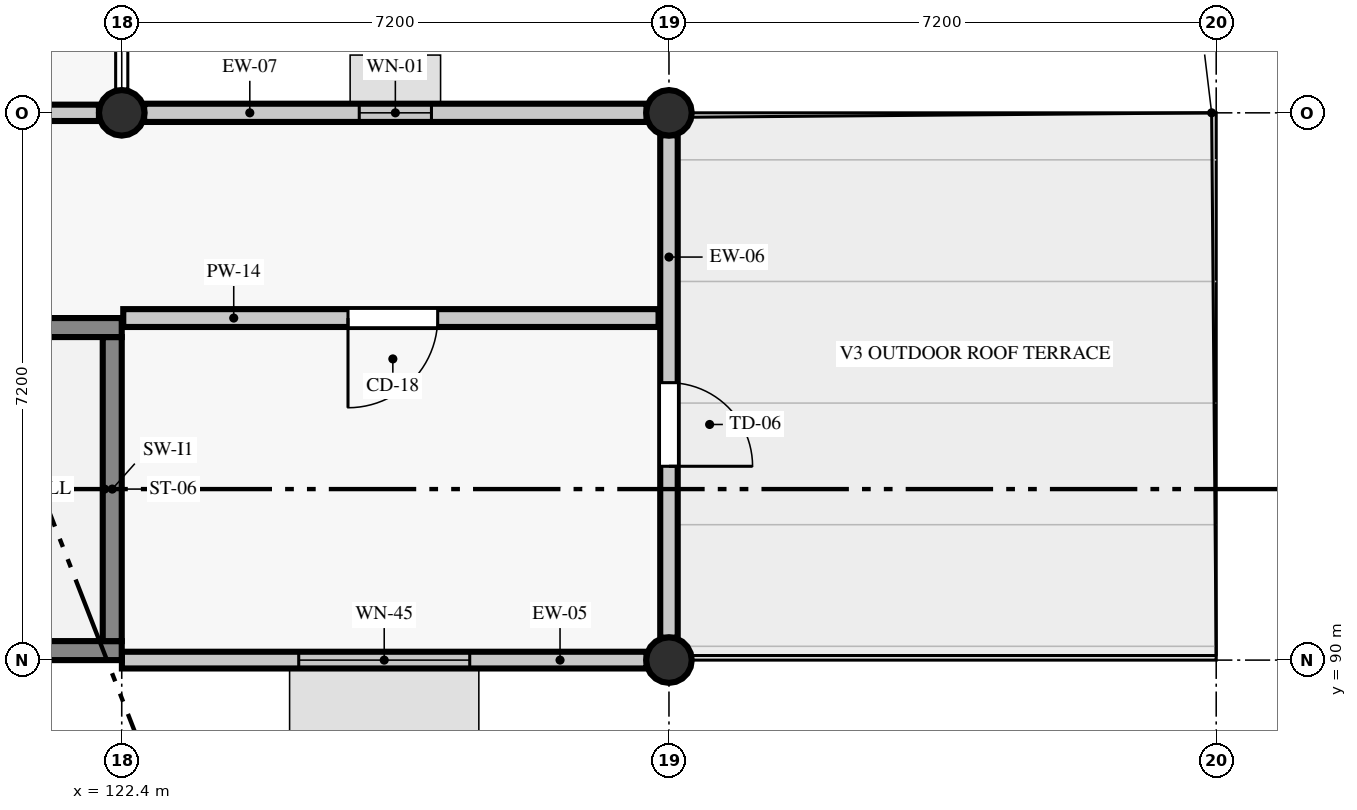
"""IFC4 building model, lengths in metres.
Left out: names, types, materials, properties, quantities, classifications, styles, units other than length and angle.
Written with IfcOpenShell. Run it as: python <this file> out.ifc"""

import sys

from ifc_helpers import new_model, si_unit, direction, frame, frame_2d, origin, origin_2d, place, context, subcontext, project, spatial, rectangle, circle, extrude, element, fill, save


model = new_model("IFC4")
c1 = context("Model", 3, precision=1e-05, world=origin(), true_north=direction((0.0, 1.0)))
c2 = subcontext(c1, "Body", "Model", "MODEL_VIEW")
j1 = project(units=[si_unit("LENGTHUNIT", "METRE"), si_unit("PLANEANGLEUNIT", "RADIAN")], contexts=[c1])
p1 = place(None, origin())
s1 = spatial("IfcSite", under=j1, at=p1, CompositionType="ELEMENT")
p2 = place(p1, origin())
s2 = spatial("IfcBuilding", under=s1, at=p2, CompositionType="ELEMENT")
p3 = place(p2, frame((0.0, 0.0, 9.6)))
s3 = spatial("IfcBuildingStorey", under=s2, at=p3, CompositionType="ELEMENT", Elevation=9.6)
p4 = place(p3, frame((122.4, 97.2, 0.0), z_axis=(0.0, 0.0, 1.0), x_axis=(1.0, 0.0, 0.0)))
e1 = element("IfcColumn", 1, at=p4, inside=s3, PredefinedType="COLUMN", context=c2, shape_type="SweptSolid", body=[
    extrude(circle(Radius=0.3, at=origin_2d()), origin(), (0.0, 0.0, 1.0), 3.925),
])
for number, where, z_axis, x_axis in (
    (2, (129.6, 90.0, 0.0), (0.0, 0.0, 1.0), (1.0, 0.0, 0.0)),
    (3, (129.6, 97.2, 0.0), (0.0, 0.0, 1.0), (1.0, 0.0, 0.0)),
):
    element("IfcColumn", number, at=place(p3, frame(where, z_axis=z_axis, x_axis=x_axis)), inside=s3, PredefinedType="COLUMN", context=c2, shape_type="SweptSolid", body=[
        extrude(circle(Radius=0.3, at=origin_2d()), origin(), (0.0, 0.0, 1.0), 3.958),
    ])
p5 = place(p3, frame((122.402, 90.0, 0.0), z_axis=(0.0, 0.0, 1.0), x_axis=(1.0, 0.0, 0.0)))
e4 = element("IfcWall", 4, at=p5, inside=s3, PredefinedType="STANDARD", context=c2, shape_type="SweptSolid", body=[
    extrude(rectangle(XDim=6.903, YDim=0.22, at=frame_2d((3.451, 0.0))), origin(), (0.0, 0.0, 1.0), 3.925),
])
p6 = place(p5, frame((2.326, 0.0, 0.9)))
e5 = element("IfcOpeningElement", 5, at=p6, cuts=e4, PredefinedType="OPENING", context=c2, shape_type="SweptSolid", body=[
    extrude(rectangle(XDim=2.25, YDim=1.78, at=frame_2d((1.125, 0.89))), frame((0.0, 0.12, 0.0), z_axis=(0.0, -1.0, 0.0), x_axis=(1.0, 0.0, 0.0)), (0.0, 0.0, 1.0), 0.24),
])
p7 = place(p3, frame((129.6, 90.295, 0.0), z_axis=(0.0, 0.0, 1.0), x_axis=(0.0, 1.0, 0.0)))
e6 = element("IfcWall", 6, at=p7, inside=s3, PredefinedType="STANDARD", context=c2, shape_type="SweptSolid", body=[
    extrude(rectangle(XDim=6.61, YDim=0.23, at=frame_2d((3.305, 0.0))), origin(), (0.0, 0.0, 1.0), 3.308),
])
p8 = place(p7, frame((2.255, 0.0, 0.0)))
e7 = element("IfcOpeningElement", 7, at=p8, cuts=e6, PredefinedType="OPENING", context=c2, shape_type="SweptSolid", body=[
    extrude(rectangle(XDim=1.1, YDim=2.12, at=frame_2d((0.55, 1.06))), frame((0.0, 0.125, 0.0), z_axis=(0.0, -1.0, 0.0), x_axis=(1.0, 0.0, 0.0)), (0.0, 0.0, 1.0), 0.25),
])
p9 = place(p3, frame((129.305, 97.2, 0.0), z_axis=(0.0, 0.0, 1.0), x_axis=(-1.0, 0.0, 0.0)))
e8 = element("IfcWall", 8, at=p9, inside=s3, PredefinedType="STANDARD", context=c2, shape_type="SweptSolid", body=[
    extrude(rectangle(XDim=6.61, YDim=0.24, at=frame_2d((3.305, 0.0))), origin(), (0.0, 0.0, 1.0), 3.308),
])
p10 = place(p9, frame((2.83, 0.0, 0.9)))
e9 = element("IfcOpeningElement", 9, at=p10, cuts=e8, PredefinedType="OPENING", context=c2, shape_type="SweptSolid", body=[
    extrude(rectangle(XDim=0.95, YDim=1.3, at=frame_2d((0.475, 0.65))), frame((0.0, 0.13, 0.0), z_axis=(0.0, -1.0, 0.0), x_axis=(1.0, 0.0, 0.0)), (0.0, 0.0, 1.0), 0.26),
])
p11 = place(p3, frame((113.6, 90.125, 0.0), z_axis=(0.0, 0.0, 1.0), x_axis=(1.0, 0.0, 0.0)))
e10 = element("IfcWall", 10, at=p11, inside=s3, PredefinedType="SHEAR", context=c2, shape_type="SweptSolid", body=[
    extrude(rectangle(XDim=8.8, YDim=0.25, at=frame_2d((4.4, 0.0))), origin(), (0.0, 0.0, 1.0), 3.925),
])
p12 = place(p11, frame((0.35, 0.0, 0.92)))
e11 = element("IfcOpeningElement", 11, at=p12, cuts=e10, PredefinedType="OPENING", context=c2, shape_type="SweptSolid", body=[
    extrude(rectangle(XDim=1.18, YDim=1.48, at=frame_2d((0.59, 0.74))), frame((0.0, 0.135, 0.0), z_axis=(0.0, -1.0, 0.0), x_axis=(1.0, 0.0, 0.0)), (0.0, 0.0, 1.0), 0.27),
])
p13 = place(p3, frame((122.275, 90.25, 0.0), z_axis=(0.0, 0.0, 1.0), x_axis=(0.0, 1.0, 0.0)))
e12 = element("IfcWall", 12, at=p13, inside=s3, PredefinedType="SHEAR", context=c2, shape_type="SweptSolid", body=[
    extrude(rectangle(XDim=4.0, YDim=0.25, at=frame_2d((2.0, 0.0))), origin(), (0.0, 0.0, 1.0), 3.925),
])
p14 = place(p3, frame((122.4, 94.375, 0.0), z_axis=(0.0, 0.0, 1.0), x_axis=(-1.0, 0.0, 0.0)))
e13 = element("IfcWall", 13, at=p14, inside=s3, PredefinedType="SHEAR", context=c2, shape_type="SweptSolid", body=[
    extrude(rectangle(XDim=8.8, YDim=0.25, at=frame_2d((4.4, 0.0))), origin(), (0.0, 0.0, 1.0), 3.925),
])
p15 = place(p14, frame((7.0, 0.0, 0.0)))
e14 = element("IfcOpeningElement", 14, at=p15, cuts=e13, PredefinedType="OPENING", context=c2, shape_type="SweptSolid", body=[
    extrude(rectangle(XDim=1.5, YDim=2.15, at=frame_2d((0.75, 1.075))), frame((0.0, 0.135, 0.0), z_axis=(0.0, -1.0, 0.0), x_axis=(1.0, 0.0, 0.0)), (0.0, 0.0, 1.0), 0.27),
])
p16 = place(p3, frame((93.9, 97.2, 0.0), z_axis=(0.0, 0.0, 1.0), x_axis=(1.0, 0.0, 0.0)))
e15 = element("IfcWall", 15, at=p16, inside=s3, PredefinedType="PARTITIONING", context=c2, shape_type="SweptSolid", body=[
    extrude(rectangle(XDim=28.2, YDim=0.215, at=frame_2d((14.1, 0.0))), origin(), (0.0, 0.0, 1.0), 3.175),
])
p17 = place(p16, frame((3.001, 0.0, 0.0)))
e16 = element("IfcOpeningElement", 16, at=p17, cuts=e15, PredefinedType="OPENING", context=c2, shape_type="SweptSolid", body=[
    extrude(rectangle(XDim=1.05, YDim=2.13, at=frame_2d((0.525, 1.065))), frame((0.0, 0.117, 0.0), z_axis=(0.0, -1.0, 0.0), x_axis=(1.0, 0.0, 0.0)), (0.0, 0.0, 1.0), 0.235),
])
p18 = place(p16, frame((8.007, 0.0, 0.0)))
e17 = element("IfcOpeningElement", 17, at=p18, cuts=e15, PredefinedType="OPENING", context=c2, shape_type="SweptSolid", body=[
    extrude(rectangle(XDim=1.1, YDim=2.13, at=frame_2d((0.55, 1.065))), frame((0.0, 0.117, 0.0), z_axis=(0.0, -1.0, 0.0), x_axis=(1.0, 0.0, 0.0)), (0.0, 0.0, 1.0), 0.235),
])
p19 = place(p16, frame((10.04, 0.0, 0.0)))
e18 = element("IfcOpeningElement", 18, at=p19, cuts=e15, PredefinedType="OPENING", context=c2, shape_type="SweptSolid", body=[
    extrude(rectangle(XDim=1.15, YDim=2.13, at=frame_2d((0.575, 1.065))), frame((0.0, 0.117, 0.0), z_axis=(0.0, -1.0, 0.0), x_axis=(1.0, 0.0, 0.0)), (0.0, 0.0, 1.0), 0.235),
])
p20 = place(p16, frame((15.09, 0.0, 0.0)))
e19 = element("IfcOpeningElement", 19, at=p20, cuts=e15, PredefinedType="OPENING", context=c2, shape_type="SweptSolid", body=[
    extrude(rectangle(XDim=0.9, YDim=2.08, at=frame_2d((0.45, 1.04))), frame((0.0, 0.117, 0.0), z_axis=(0.0, -1.0, 0.0), x_axis=(1.0, 0.0, 0.0)), (0.0, 0.0, 1.0), 0.235),
])
p21 = place(p16, frame((17.3, 0.0, 0.0)))
e20 = element("IfcOpeningElement", 20, at=p21, cuts=e15, PredefinedType="OPENING", context=c2, shape_type="SweptSolid", body=[
    extrude(rectangle(XDim=0.9, YDim=2.13, at=frame_2d((0.45, 1.065))), frame((0.0, 0.117, 0.0), z_axis=(0.0, -1.0, 0.0), x_axis=(1.0, 0.0, 0.0)), (0.0, 0.0, 1.0), 0.235),
])
p22 = place(p16, frame((19.56, 0.0, 0.0)))
e21 = element("IfcOpeningElement", 21, at=p22, cuts=e15, PredefinedType="OPENING", context=c2, shape_type="SweptSolid", body=[
    extrude(rectangle(XDim=0.92, YDim=2.18, at=frame_2d((0.46, 1.09))), frame((0.0, 0.117, 0.0), z_axis=(0.0, -1.0, 0.0), x_axis=(1.0, 0.0, 0.0)), (0.0, 0.0, 1.0), 0.235),
])
p23 = place(p16, frame((24.318, 0.0, 0.0)))
e22 = element("IfcOpeningElement", 22, at=p23, cuts=e15, PredefinedType="OPENING", context=c2, shape_type="SweptSolid", body=[
    extrude(rectangle(XDim=1.08, YDim=2.18, at=frame_2d((0.54, 1.09))), frame((0.0, 0.117, 0.0), z_axis=(0.0, -1.0, 0.0), x_axis=(1.0, 0.0, 0.0)), (0.0, 0.0, 1.0), 0.235),
])
p24 = place(p3, frame((122.42, 94.5, 0.0), z_axis=(0.0, 0.0, 1.0), x_axis=(1.0, 0.0, 0.0)))
e23 = element("IfcWall", 23, at=p24, inside=s3, PredefinedType="PARTITIONING", context=c2, shape_type="SweptSolid", body=[
    extrude(rectangle(XDim=7.043, YDim=0.235, at=frame_2d((3.521, 0.0))), origin(), (0.0, 0.0, 1.0), 3.925),
])
p25 = place(p24, frame((2.957, 0.0, 0.0)))
e24 = element("IfcOpeningElement", 24, at=p25, cuts=e23, PredefinedType="OPENING", context=c2, shape_type="SweptSolid", body=[
    extrude(rectangle(XDim=1.18, YDim=2.18, at=frame_2d((0.59, 1.09))), frame((0.0, 0.127, 0.0), z_axis=(0.0, -1.0, 0.0), x_axis=(1.0, 0.0, 0.0)), (0.0, 0.0, 1.0), 0.255),
])
p26 = place(p6, origin())
e25 = element("IfcWindow", 25, at=p26, inside=s3, PartitioningType="SINGLE_PANEL", PredefinedType="WINDOW", context=c2, shape_type="SweptSolid", body=[
    extrude(rectangle(XDim=2.25, YDim=1.78, at=frame_2d((1.125, 0.89))), frame((0.0, 0.03, 0.0), z_axis=(0.0, -1.0, 0.0), x_axis=(1.0, 0.0, 0.0)), (0.0, 0.0, 1.0), 0.06),
])
fill(e5, e25)
p27 = place(p8, frame((1.1, 0.0, 0.0), z_axis=(0.0, 0.0, 1.0), x_axis=(-1.0, 0.0, 0.0)))
e26 = element("IfcDoor", 26, at=p27, inside=s3, OperationType="SINGLE_SWING_RIGHT", PredefinedType="DOOR", context=c2, shape_type="SweptSolid", body=[
    extrude(rectangle(XDim=1.1, YDim=2.12, at=frame_2d((0.55, 1.06))), frame((0.0, 0.025, 0.0), z_axis=(0.0, -1.0, 0.0), x_axis=(1.0, 0.0, 0.0)), (0.0, 0.0, 1.0), 0.05),
])
fill(e7, e26)
p28 = place(p10, origin())
e27 = element("IfcWindow", 27, at=p28, inside=s3, PartitioningType="SINGLE_PANEL", PredefinedType="WINDOW", context=c2, shape_type="SweptSolid", body=[
    extrude(rectangle(XDim=0.95, YDim=1.3, at=frame_2d((0.475, 0.65))), frame((0.0, 0.03, 0.0), z_axis=(0.0, -1.0, 0.0), x_axis=(1.0, 0.0, 0.0)), (0.0, 0.0, 1.0), 0.06),
])
fill(e9, e27)
p29 = place(p25, frame((1.18, 0.0, 0.0), z_axis=(0.0, 0.0, 1.0), x_axis=(-1.0, 0.0, 0.0)))
e28 = element("IfcDoor", 28, at=p29, inside=s3, OperationType="SINGLE_SWING_RIGHT", PredefinedType="DOOR", context=c2, shape_type="SweptSolid", body=[
    extrude(rectangle(XDim=1.18, YDim=2.18, at=frame_2d((0.59, 1.09))), frame((0.0, 0.025, 0.0), z_axis=(0.0, -1.0, 0.0), x_axis=(1.0, 0.0, 0.0)), (0.0, 0.0, 1.0), 0.05),
])
fill(e24, e28)
save(model, sys.argv[1])
